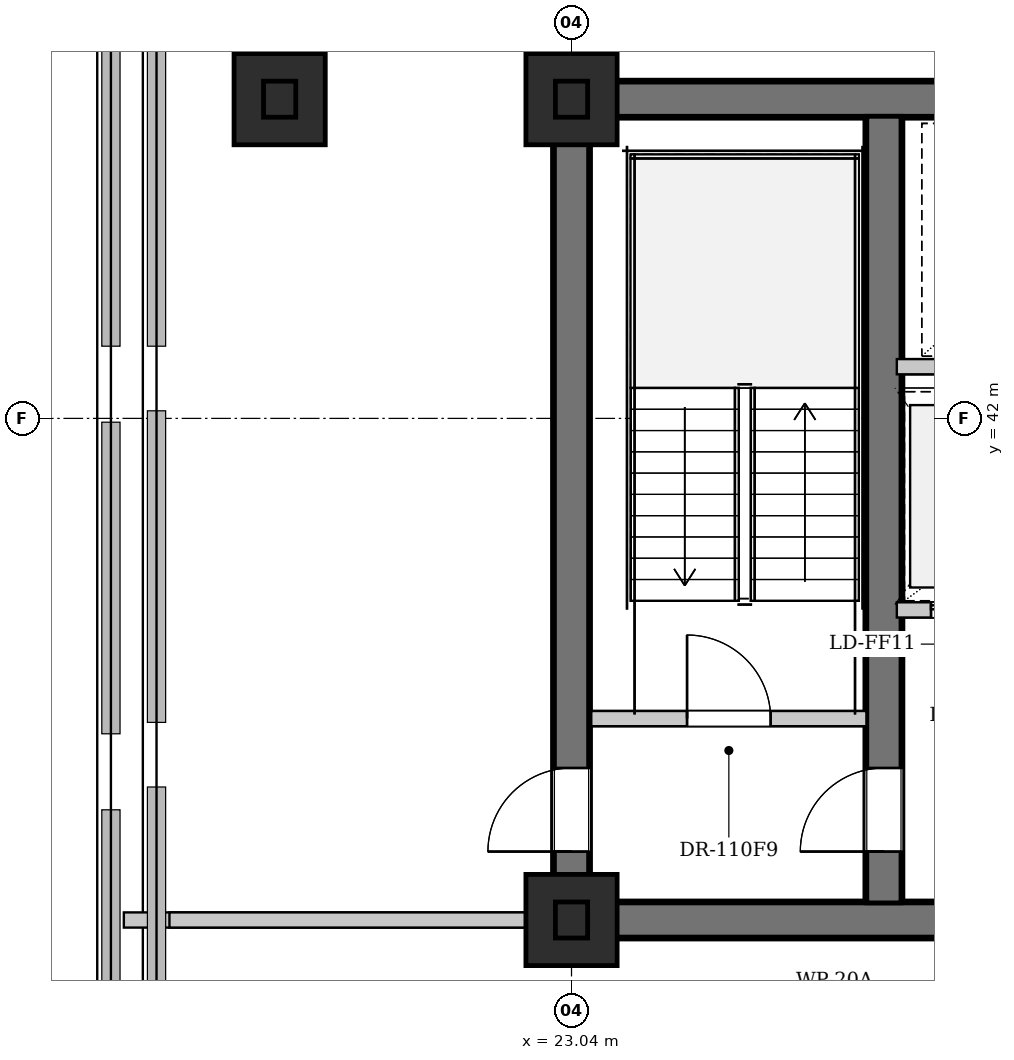
"""IFC4 building model, lengths in metres.
Left out: names, types, materials, properties, quantities, classifications, styles, units other than length and angle.
Written with IfcOpenShell. Run it as: python <this file> out.ifc"""

import sys

from ifc_helpers import new_model, si_unit, direction, frame, frame_2d, origin, origin_2d, place, context, subcontext, project, spatial, rectangle, extrude, element, fill, save


model = new_model("IFC4")
c1 = context("Model", 3, precision=1e-05, world=origin(), true_north=direction((0.0, 1.0)))
c2 = subcontext(c1, "Body", "Model", "MODEL_VIEW")
j1 = project(units=[si_unit("LENGTHUNIT", "METRE"), si_unit("PLANEANGLEUNIT", "RADIAN")], contexts=[c1])
p1 = place(None, origin())
s1 = spatial("IfcSite", under=j1, at=p1, CompositionType="ELEMENT")
p2 = place(p1, origin())
s2 = spatial("IfcBuilding", under=s1, at=p2, CompositionType="ELEMENT")
p3 = place(p2, frame((0.0, 0.0, 78.0)))
s3 = spatial("IfcBuildingStorey", under=s2, at=p3, CompositionType="ELEMENT", Elevation=78.0)
p4 = place(p3, frame((22.79, 46.2, 0.0), z_axis=(0.0, 0.0, 1.0), x_axis=(1.0, 0.0, 0.0)))
e1 = element("IfcWall", 1, at=p4, inside=s3, PredefinedType="SHEAR", context=c2, shape_type="SweptSolid", body=[
    extrude(rectangle(XDim=31.22, YDim=0.5, at=frame_2d((15.61, 0.0))), origin(), (0.0, 0.0, 1.0), 3.68),
])
p5 = place(p3, frame((22.79, 35.4, 0.0), z_axis=(0.0, 0.0, 1.0), x_axis=(1.0, 0.0, 0.0)))
e2 = element("IfcWall", 2, at=p5, inside=s3, PredefinedType="SHEAR", context=c2, shape_type="SweptSolid", body=[
    extrude(rectangle(XDim=5.41, YDim=0.5, at=frame_2d((2.705, 0.0))), origin(), (0.0, 0.0, 1.0), 3.68),
])
p6 = place(p3, frame((23.04, 35.65, 0.0), z_axis=(0.0, 0.0, 1.0), x_axis=(0.0, 1.0, 0.0)))
e3 = element("IfcWall", 3, at=p6, inside=s3, PredefinedType="SHEAR", context=c2, shape_type="SweptSolid", body=[
    extrude(rectangle(XDim=10.3, YDim=0.5, at=frame_2d((5.15, 0.0))), origin(), (0.0, 0.0, 1.0), 3.68),
])
p7 = place(p6, frame((0.65, 0.0, 0.0)))
e4 = element("IfcOpeningElement", 4, at=p7, cuts=e3, PredefinedType="OPENING", context=c2, shape_type="SweptSolid", body=[
    extrude(rectangle(XDim=1.1, YDim=2.15, at=frame_2d((0.55, 1.075))), frame((0.0, 0.26, 0.0), z_axis=(0.0, -1.0, 0.0), x_axis=(1.0, 0.0, 0.0)), (0.0, 0.0, 1.0), 0.52),
])
p8 = place(p3, frame((27.15, 35.65, 0.0), z_axis=(0.0, 0.0, 1.0), x_axis=(0.0, 1.0, 0.0)))
e5 = element("IfcWall", 5, at=p8, inside=s3, PredefinedType="SHEAR", context=c2, shape_type="SweptSolid", body=[
    extrude(rectangle(XDim=10.3, YDim=0.5, at=frame_2d((5.15, 0.0))), origin(), (0.0, 0.0, 1.0), 3.68),
])
p9 = place(p8, frame((0.65, 0.0, 0.0)))
e6 = element("IfcOpeningElement", 6, at=p9, cuts=e5, PredefinedType="OPENING", context=c2, shape_type="SweptSolid", body=[
    extrude(rectangle(XDim=1.1, YDim=2.15, at=frame_2d((0.55, 1.075))), frame((0.0, 0.26, 0.0), z_axis=(0.0, -1.0, 0.0), x_axis=(1.0, 0.0, 0.0)), (0.0, 0.0, 1.0), 0.52),
])
for number, where, z_axis, x_axis in (
    (7, (23.04, 35.4, 0.0), (0.0, 0.0, 1.0), (1.0, 0.0, 0.0)),
    (8, (23.04, 46.2, 0.0), (0.0, 0.0, 1.0), (1.0, 0.0, 0.0)),
    (9, (19.2, 46.2, 0.0), (0.0, 0.0, 1.0), (1.0, 0.0, 0.0)),
):
    element("IfcColumn", number, at=place(p3, frame(where, z_axis=z_axis, x_axis=x_axis)), inside=s3, PredefinedType="COLUMN", context=c2, shape_type="SweptSolid", body=[
        extrude(rectangle(XDim=1.2, YDim=1.2, at=origin_2d()), origin(), (0.0, 0.0, 1.0), 3.9),
    ])
p10 = place(p3, frame((23.3, 38.05, 0.0), z_axis=(0.0, 0.0, 1.0), x_axis=(1.0, 0.0, 0.0)))
e10 = element("IfcWall", 10, at=p10, inside=s3, PredefinedType="PARTITIONING", context=c2, shape_type="SweptSolid", body=[
    extrude(rectangle(XDim=3.62, YDim=0.2, at=frame_2d((1.81, 0.0))), origin(), (0.0, 0.0, 1.0), 3.68),
])
p11 = place(p10, frame((1.26, 0.0, 0.0)))
e11 = element("IfcOpeningElement", 11, at=p11, cuts=e10, PredefinedType="OPENING", context=c2, shape_type="SweptSolid", body=[
    extrude(rectangle(XDim=1.1, YDim=2.15, at=frame_2d((0.55, 1.075))), frame((0.0, 0.11, 0.0), z_axis=(0.0, -1.0, 0.0), x_axis=(1.0, 0.0, 0.0)), (0.0, 0.0, 1.0), 0.22),
])
p12 = place(p3, frame((27.32, 39.48, 0.0), z_axis=(0.0, 0.0, 1.0), x_axis=(1.0, 0.0, 0.0)))
e12 = element("IfcWall", 12, at=p12, inside=s3, PredefinedType="PARTITIONING", context=c2, shape_type="SweptSolid", body=[
    extrude(rectangle(XDim=3.94, YDim=0.2, at=frame_2d((1.97, 0.0))), origin(), (0.0, 0.0, 1.0), 3.68),
])
p13 = place(p12, frame((0.45, 0.0, 0.0)))
e13 = element("IfcOpeningElement", 13, at=p13, cuts=e12, PredefinedType="OPENING", context=c2, shape_type="SweptSolid", body=[
    extrude(rectangle(XDim=1.1, YDim=2.2, at=frame_2d((0.55, 1.1))), frame((0.0, 0.11, 0.0), z_axis=(0.0, -1.0, 0.0), x_axis=(1.0, 0.0, 0.0)), (0.0, 0.0, 1.0), 0.22),
])
p14 = place(p12, frame((2.41, 0.0, 0.0)))
e14 = element("IfcOpeningElement", 14, at=p14, cuts=e12, PredefinedType="OPENING", context=c2, shape_type="SweptSolid", body=[
    extrude(rectangle(XDim=1.1, YDim=2.2, at=frame_2d((0.55, 1.1))), frame((0.0, 0.11, 0.0), z_axis=(0.0, -1.0, 0.0), x_axis=(1.0, 0.0, 0.0)), (0.0, 0.0, 1.0), 0.22),
])
p15 = place(p3, frame((27.32, 42.68, 0.0), z_axis=(0.0, 0.0, 1.0), x_axis=(1.0, 0.0, 0.0)))
e15 = element("IfcWall", 15, at=p15, inside=s3, PredefinedType="PARTITIONING", context=c2, shape_type="SweptSolid", body=[
    extrude(rectangle(XDim=5.33, YDim=0.2, at=frame_2d((2.665, 0.0))), origin(), (0.0, 0.0, 1.0), 3.68),
])
p16 = place(p15, frame((4.18, 0.0, 0.0)))
e16 = element("IfcOpeningElement", 16, at=p16, cuts=e15, PredefinedType="OPENING", context=c2, shape_type="SweptSolid", body=[
    extrude(rectangle(XDim=0.9, YDim=2.15, at=frame_2d((0.45, 1.075))), frame((0.0, 0.11, 0.0), z_axis=(0.0, -1.0, 0.0), x_axis=(1.0, 0.0, 0.0)), (0.0, 0.0, 1.0), 0.22),
])
p17 = place(p3, frame((17.15, 35.4, 0.0), z_axis=(0.0, 0.0, 1.0), x_axis=(1.0, 0.0, 0.0)))
e17 = element("IfcWall", 17, at=p17, inside=s3, PredefinedType="PARTITIONING", context=c2, shape_type="SweptSolid", body=[
    extrude(rectangle(XDim=5.6, YDim=0.2, at=frame_2d((2.8, 0.0))), origin(), (0.0, 0.0, 1.0), 3.68),
])
p18 = place(p11, origin())
e18 = element("IfcDoor", 18, at=p18, inside=s3, OperationType="SINGLE_SWING_LEFT", PredefinedType="DOOR", context=c2, shape_type="SweptSolid", body=[
    extrude(rectangle(XDim=1.1, YDim=2.15, at=frame_2d((0.55, 1.075))), frame((0.0, 0.025, 0.0), z_axis=(0.0, -1.0, 0.0), x_axis=(1.0, 0.0, 0.0)), (0.0, 0.0, 1.0), 0.05),
])
fill(e11, e18)
p19 = place(p13, origin())
e19 = element("IfcDoor", 19, at=p19, inside=s3, OperationType="DOUBLE_DOOR_SLIDING", PredefinedType="DOOR", context=c2, shape_type="SweptSolid", body=[
    extrude(rectangle(XDim=1.1, YDim=2.2, at=frame_2d((0.55, 1.1))), frame((0.0, 0.025, 0.0), z_axis=(0.0, -1.0, 0.0), x_axis=(1.0, 0.0, 0.0)), (0.0, 0.0, 1.0), 0.05),
])
fill(e13, e19)
p20 = place(p9, origin())
e20 = element("IfcDoor", 20, at=p20, inside=s3, OperationType="SINGLE_SWING_LEFT", PredefinedType="DOOR", context=c2, shape_type="SweptSolid", body=[
    extrude(rectangle(XDim=1.1, YDim=2.15, at=frame_2d((0.55, 1.075))), frame((0.0, 0.025, 0.0), z_axis=(0.0, -1.0, 0.0), x_axis=(1.0, 0.0, 0.0)), (0.0, 0.0, 1.0), 0.05),
])
fill(e6, e20)
p21 = place(p7, origin())
e21 = element("IfcDoor", 21, at=p21, inside=s3, OperationType="SINGLE_SWING_LEFT", PredefinedType="DOOR", context=c2, shape_type="SweptSolid", body=[
    extrude(rectangle(XDim=1.1, YDim=2.15, at=frame_2d((0.55, 1.075))), frame((0.0, 0.025, 0.0), z_axis=(0.0, -1.0, 0.0), x_axis=(1.0, 0.0, 0.0)), (0.0, 0.0, 1.0), 0.05),
])
fill(e4, e21)
save(model, sys.argv[1])
